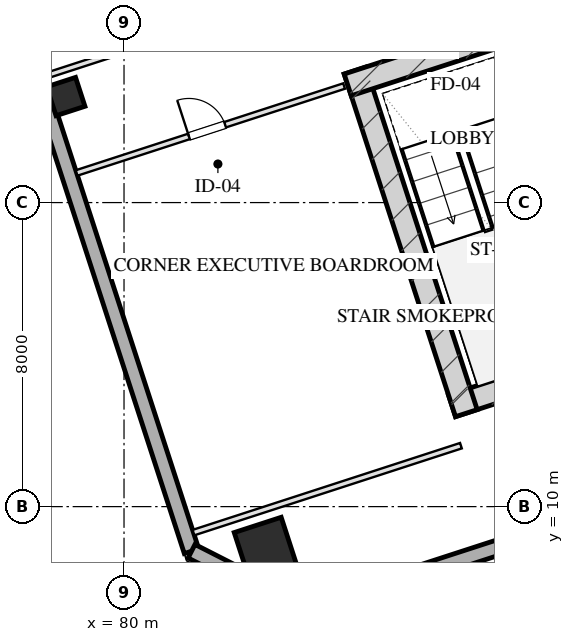
"""IFC4 building model, lengths in metres.
Left out: names, types, materials, properties, quantities, classifications, styles, units other than length and angle.
Written with IfcOpenShell. Run it as: python <this file> out.ifc"""

import sys

from ifc_helpers import new_model, si_unit, direction, frame, frame_2d, origin, origin_2d, place, context, subcontext, project, spatial, rectangle, hollow_rectangle, extrude, element, fill, save


model = new_model("IFC4")
c1 = context("Model", 3, precision=1e-05, world=origin(), true_north=direction((0.0, 1.0)))
c2 = subcontext(c1, "Body", "Model", "MODEL_VIEW")
j1 = project(units=[si_unit("LENGTHUNIT", "METRE"), si_unit("PLANEANGLEUNIT", "RADIAN")], contexts=[c1])
p1 = place(None, origin())
s1 = spatial("IfcSite", under=j1, at=p1, CompositionType="ELEMENT")
p2 = place(p1, origin())
s2 = spatial("IfcBuilding", under=s1, at=p2, CompositionType="ELEMENT")
p3 = place(p2, frame((0.0, 0.0, 170.2)))
s3 = spatial("IfcBuildingStorey", under=s2, at=p3, CompositionType="ELEMENT", Elevation=170.2)
p4 = place(p3, frame((88.63, 12.652, 0.0), z_axis=(0.0, 0.0, 1.0), x_axis=(0.95105714907, 0.309015046886, 0.0)))
e1 = element("IfcWall", 1, at=p4, inside=s3, PredefinedType="SHEAR", context=c2, shape_type="SweptSolid", body=[
    extrude(rectangle(XDim=16.4, YDim=0.6, at=frame_2d((8.2, 0.0))), origin(), (0.0, 0.0, 1.0), 3.45),
])
p5 = place(p3, frame((86.078, 21.475, 0.0), z_axis=(0.0, 0.0, 1.0), x_axis=(0.309017938678, -0.951056209472, 0.0)))
e2 = element("IfcWall", 2, at=p5, inside=s3, PredefinedType="SHEAR", context=c2, shape_type="SweptSolid", body=[
    extrude(rectangle(XDim=9.48, YDim=0.6, at=frame_2d((4.74, 0.0))), origin(), (0.0, 0.0, 1.0), 3.45),
])
p6 = place(p3, frame((85.886, 21.097, 0.0), z_axis=(0.0, 0.0, 1.0), x_axis=(0.951068073652, 0.308981422225, 0.0)))
e3 = element("IfcWall", 3, at=p6, inside=s3, PredefinedType="SHEAR", context=c2, shape_type="SweptSolid", body=[
    extrude(rectangle(XDim=4.22, YDim=0.6, at=frame_2d((2.11, 0.0))), origin(), (0.0, 0.0, 1.0), 3.45),
])
p7 = place(p3, frame((83.719, 8.901, 0.0), z_axis=(0.0, 0.0, 1.0), x_axis=(0.951056516295, 0.309016994375, 0.0)))
e4 = element("IfcColumn", 4, at=p7, inside=s3, PredefinedType="COLUMN", context=c2, shape_type="SweptSolid", body=[
    extrude(hollow_rectangle(XDim=1.3, YDim=1.3, WallThickness=0.045, at=origin_2d()), origin(), (0.0, 0.0, 1.0), 3.451),
])
p8 = place(p3, frame((78.468, 20.79, 0.0), z_axis=(0.0, 0.0, 1.0), x_axis=(0.951056516295, 0.309016994375, 0.0)))
e5 = element("IfcColumn", 5, at=p8, inside=s3, PredefinedType="COLUMN", context=c2, shape_type="SweptSolid", body=[
    extrude(hollow_rectangle(XDim=0.8, YDim=0.8, WallThickness=0.028, at=origin_2d()), origin(), (0.0, 0.0, 1.0), 3.451),
])
p9 = place(p3, frame((81.776, 8.827, 0.0), z_axis=(0.0, 0.0, 1.0), x_axis=(-0.309014228706, 0.951057414911, 0.0)))
e6 = element("IfcWall", 6, at=p9, inside=s3, PredefinedType="SOLIDWALL", context=c2, shape_type="SweptSolid", body=[
    extrude(rectangle(XDim=42.8, YDim=0.4, at=frame_2d((21.4, 0.0))), origin(), (0.0, 0.0, 1.0), 2.61),
])
p10 = place(p3, frame((109.908, 15.444, 0.0), z_axis=(0.0, 0.0, 1.0), x_axis=(-0.951057580055, -0.30901372044, 0.0)))
e7 = element("IfcWall", 7, at=p10, inside=s3, PredefinedType="SOLIDWALL", context=c2, shape_type="SweptSolid", body=[
    extrude(rectangle(XDim=26.4, YDim=0.4, at=frame_2d((13.2, 0.0))), origin(), (0.0, 0.0, 1.0), 2.61),
])
p11 = place(p3, frame((84.801, 7.286, 0.0), z_axis=(0.0, 0.0, 1.0), x_axis=(-0.891020832027, 0.453962417932, 0.0)))
e8 = element("IfcWall", 8, at=p11, inside=s3, PredefinedType="SOLIDWALL", context=c2, shape_type="SweptSolid", body=[
    extrude(rectangle(XDim=3.394, YDim=0.4, at=frame_2d((1.697, 0.0))), origin(), (0.0, 0.0, 1.0), 2.61),
])
p12 = place(p3, frame((81.828, 9.316, 0.0), z_axis=(0.0, 0.0, 1.0), x_axis=(0.95105128112, 0.309033106124, 0.0)))
e9 = element("IfcWall", 9, at=p12, inside=s3, PredefinedType="PARTITIONING", context=c2, shape_type="SweptSolid", body=[
    extrude(rectangle(XDim=7.4, YDim=0.15, at=frame_2d((3.7, 0.0))), origin(), (0.0, 0.0, 1.0), 3.175),
])
p13 = place(p3, frame((78.753, 18.78, 0.0), z_axis=(0.0, 0.0, 1.0), x_axis=(0.951060977215, 0.309003264738, 0.0)))
e10 = element("IfcWall", 10, at=p13, inside=s3, PredefinedType="PARTITIONING", context=c2, shape_type="SweptSolid", body=[
    extrude(rectangle(XDim=7.4, YDim=0.15, at=frame_2d((3.7, 0.0))), origin(), (0.0, 0.0, 1.0), 3.175),
])
p14 = place(p13, frame((3.108, 0.0, 0.0)))
e11 = element("IfcOpeningElement", 11, at=p14, cuts=e10, PredefinedType="OPENING", context=c2, shape_type="SweptSolid", body=[
    extrude(rectangle(XDim=1.0, YDim=2.05, at=frame_2d((0.5, 1.025))), frame((0.0, 0.085, 0.0), z_axis=(0.0, -1.0, 0.0), x_axis=(1.0, 0.0, 0.0)), (0.0, 0.0, 1.0), 0.17),
])
p15 = place(p3, frame((77.925, 21.328, 0.0), z_axis=(0.0, 0.0, 1.0), x_axis=(0.951061887302, 0.309000463626, 0.0)))
e12 = element("IfcWall", 12, at=p15, inside=s3, PredefinedType="PARTITIONING", context=c2, shape_type="SweptSolid", body=[
    extrude(rectangle(XDim=6.9, YDim=0.15, at=frame_2d((3.45, 0.0))), origin(), (0.0, 0.0, 1.0), 3.175),
])
p16 = place(p14, origin())
e13 = element("IfcDoor", 13, at=p16, inside=s3, OperationType="SINGLE_SWING_LEFT", PredefinedType="DOOR", context=c2, shape_type="SweptSolid", body=[
    extrude(rectangle(XDim=1.0, YDim=2.05, at=frame_2d((0.5, 1.025))), frame((0.0, 0.025, 0.0), z_axis=(0.0, -1.0, 0.0), x_axis=(1.0, 0.0, 0.0)), (0.0, 0.0, 1.0), 0.05),
])
fill(e11, e13)
save(model, sys.argv[1])
